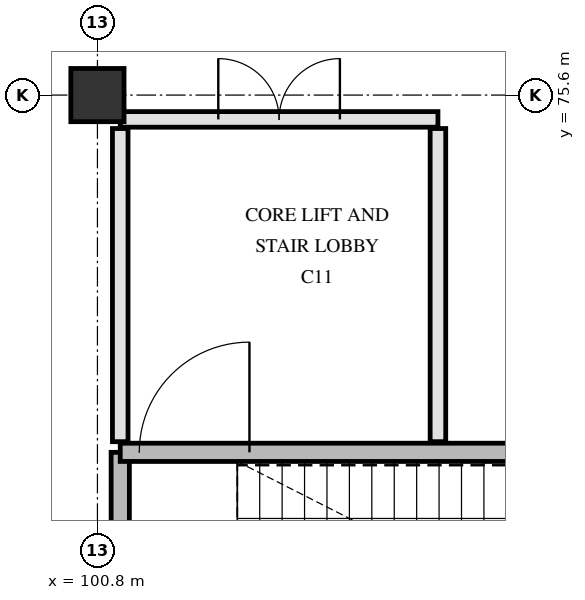
"""IFC4 building model, lengths in metres.
Left out: names, types, materials, properties, quantities, classifications, styles, units other than length and angle.
Written with IfcOpenShell. Run it as: python <this file> out.ifc"""

import sys

from ifc_helpers import new_model, si_unit, direction, frame, frame_2d, origin, origin_2d, place, context, subcontext, project, spatial, rectangle, extrude, element, fill, save


model = new_model("IFC4")
c1 = context("Model", 3, precision=1e-05, world=origin(), true_north=direction((0.0, 1.0)))
c2 = subcontext(c1, "Body", "Model", "MODEL_VIEW")
j1 = project(units=[si_unit("LENGTHUNIT", "METRE"), si_unit("PLANEANGLEUNIT", "RADIAN")], contexts=[c1])
p1 = place(None, origin())
s1 = spatial("IfcSite", under=j1, at=p1, CompositionType="ELEMENT")
p2 = place(p1, origin())
s2 = spatial("IfcBuilding", under=s1, at=p2, CompositionType="ELEMENT")
p3 = place(p2, frame((0.0, 0.0, 14.4)))
s3 = spatial("IfcBuildingStorey", under=s2, at=p3, CompositionType="ELEMENT", Elevation=14.4)
p4 = place(p3, frame((100.8, 75.6, 0.0), z_axis=(0.0, 0.0, 1.0), x_axis=(1.0, 0.0, 0.0)))
e1 = element("IfcColumn", 1, at=p4, inside=s3, PredefinedType="COLUMN", context=c2, shape_type="SweptSolid", body=[
    extrude(rectangle(XDim=0.7, YDim=0.7, at=origin_2d()), origin(), (0.0, 0.0, 1.0), 4.2),
])
p5 = place(p3, frame((101.1, 67.58, 0.0), z_axis=(0.0, 0.0, 1.0), x_axis=(0.0, 1.0, 0.0)))
e2 = element("IfcWall", 2, at=p5, inside=s3, PredefinedType="SHEAR", context=c2, shape_type="SweptSolid", body=[
    extrude(rectangle(XDim=3.32, YDim=0.24, at=frame_2d((1.66, 0.0))), origin(), (0.0, 0.0, 1.0), 3.9),
])
p6 = place(p3, frame((101.1, 70.9, 0.0), z_axis=(0.0, 0.0, 1.0), x_axis=(1.0, 0.0, 0.0)))
e3 = element("IfcWall", 3, at=p6, inside=s3, PredefinedType="SHEAR", context=c2, shape_type="SweptSolid", body=[
    extrude(rectangle(XDim=7.82, YDim=0.24, at=frame_2d((3.91, 0.0))), origin(), (0.0, 0.0, 1.0), 3.9),
])
p7 = place(p6, frame((0.25, 0.0, 0.0)))
e4 = element("IfcOpeningElement", 4, at=p7, cuts=e3, PredefinedType="OPENING", context=c2, shape_type="SweptSolid", body=[
    extrude(rectangle(XDim=1.45, YDim=2.2, at=frame_2d((0.725, 1.1))), frame((0.0, 0.13, 0.0), z_axis=(0.0, -1.0, 0.0), x_axis=(1.0, 0.0, 0.0)), (0.0, 0.0, 1.0), 0.26),
])
p8 = place(p3, frame((105.28, 71.04, 0.0), z_axis=(0.0, 0.0, 1.0), x_axis=(0.0, 1.0, 0.0)))
e5 = element("IfcWall", 5, at=p8, inside=s3, PredefinedType="PARTITIONING", context=c2, shape_type="SweptSolid", body=[
    extrude(rectangle(XDim=4.12, YDim=0.205, at=frame_2d((2.06, 0.0))), origin(), (0.0, 0.0, 1.0), 3.89),
])
p9 = place(p3, frame((101.1, 71.04, 0.0), z_axis=(0.0, 0.0, 1.0), x_axis=(0.0, 1.0, 0.0)))
e6 = element("IfcWall", 6, at=p9, inside=s3, PredefinedType="PARTITIONING", context=c2, shape_type="SweptSolid", body=[
    extrude(rectangle(XDim=4.12, YDim=0.205, at=frame_2d((2.06, 0.0))), origin(), (0.0, 0.0, 1.0), 2.69),
])
p10 = place(p3, frame((101.1, 75.28, 0.0), z_axis=(0.0, 0.0, 1.0), x_axis=(1.0, 0.0, 0.0)))
e7 = element("IfcWall", 7, at=p10, inside=s3, PredefinedType="PARTITIONING", context=c2, shape_type="SweptSolid", body=[
    extrude(rectangle(XDim=4.18, YDim=0.205, at=frame_2d((2.09, 0.0))), origin(), (0.0, 0.0, 1.0), 2.69),
])
p11 = place(p10, frame((1.29, 0.0, 0.0)))
e8 = element("IfcOpeningElement", 8, at=p11, cuts=e7, PredefinedType="OPENING", context=c2, shape_type="SweptSolid", body=[
    extrude(rectangle(XDim=1.6, YDim=2.25, at=frame_2d((0.8, 1.125))), frame((0.0, 0.113, 0.0), z_axis=(0.0, -1.0, 0.0), x_axis=(1.0, 0.0, 0.0)), (0.0, 0.0, 1.0), 0.225),
])
p12 = place(p7, origin())
e9 = element("IfcDoor", 9, at=p12, inside=s3, OperationType="SINGLE_SWING_RIGHT", PredefinedType="DOOR", context=c2, shape_type="SweptSolid", body=[
    extrude(rectangle(XDim=1.45, YDim=2.2, at=frame_2d((0.725, 1.1))), frame((0.0, 0.025, 0.0), z_axis=(0.0, -1.0, 0.0), x_axis=(1.0, 0.0, 0.0)), (0.0, 0.0, 1.0), 0.05),
])
fill(e4, e9)
p13 = place(p11, origin())
e10 = element("IfcDoor", 10, at=p13, inside=s3, OperationType="DOUBLE_SWING_LEFT", PredefinedType="DOOR", context=c2, shape_type="SweptSolid", body=[
    extrude(rectangle(XDim=1.6, YDim=2.25, at=frame_2d((0.8, 1.125))), frame((0.0, 0.025, 0.0), z_axis=(0.0, -1.0, 0.0), x_axis=(1.0, 0.0, 0.0)), (0.0, 0.0, 1.0), 0.05),
])
fill(e8, e10)
save(model, sys.argv[1])
